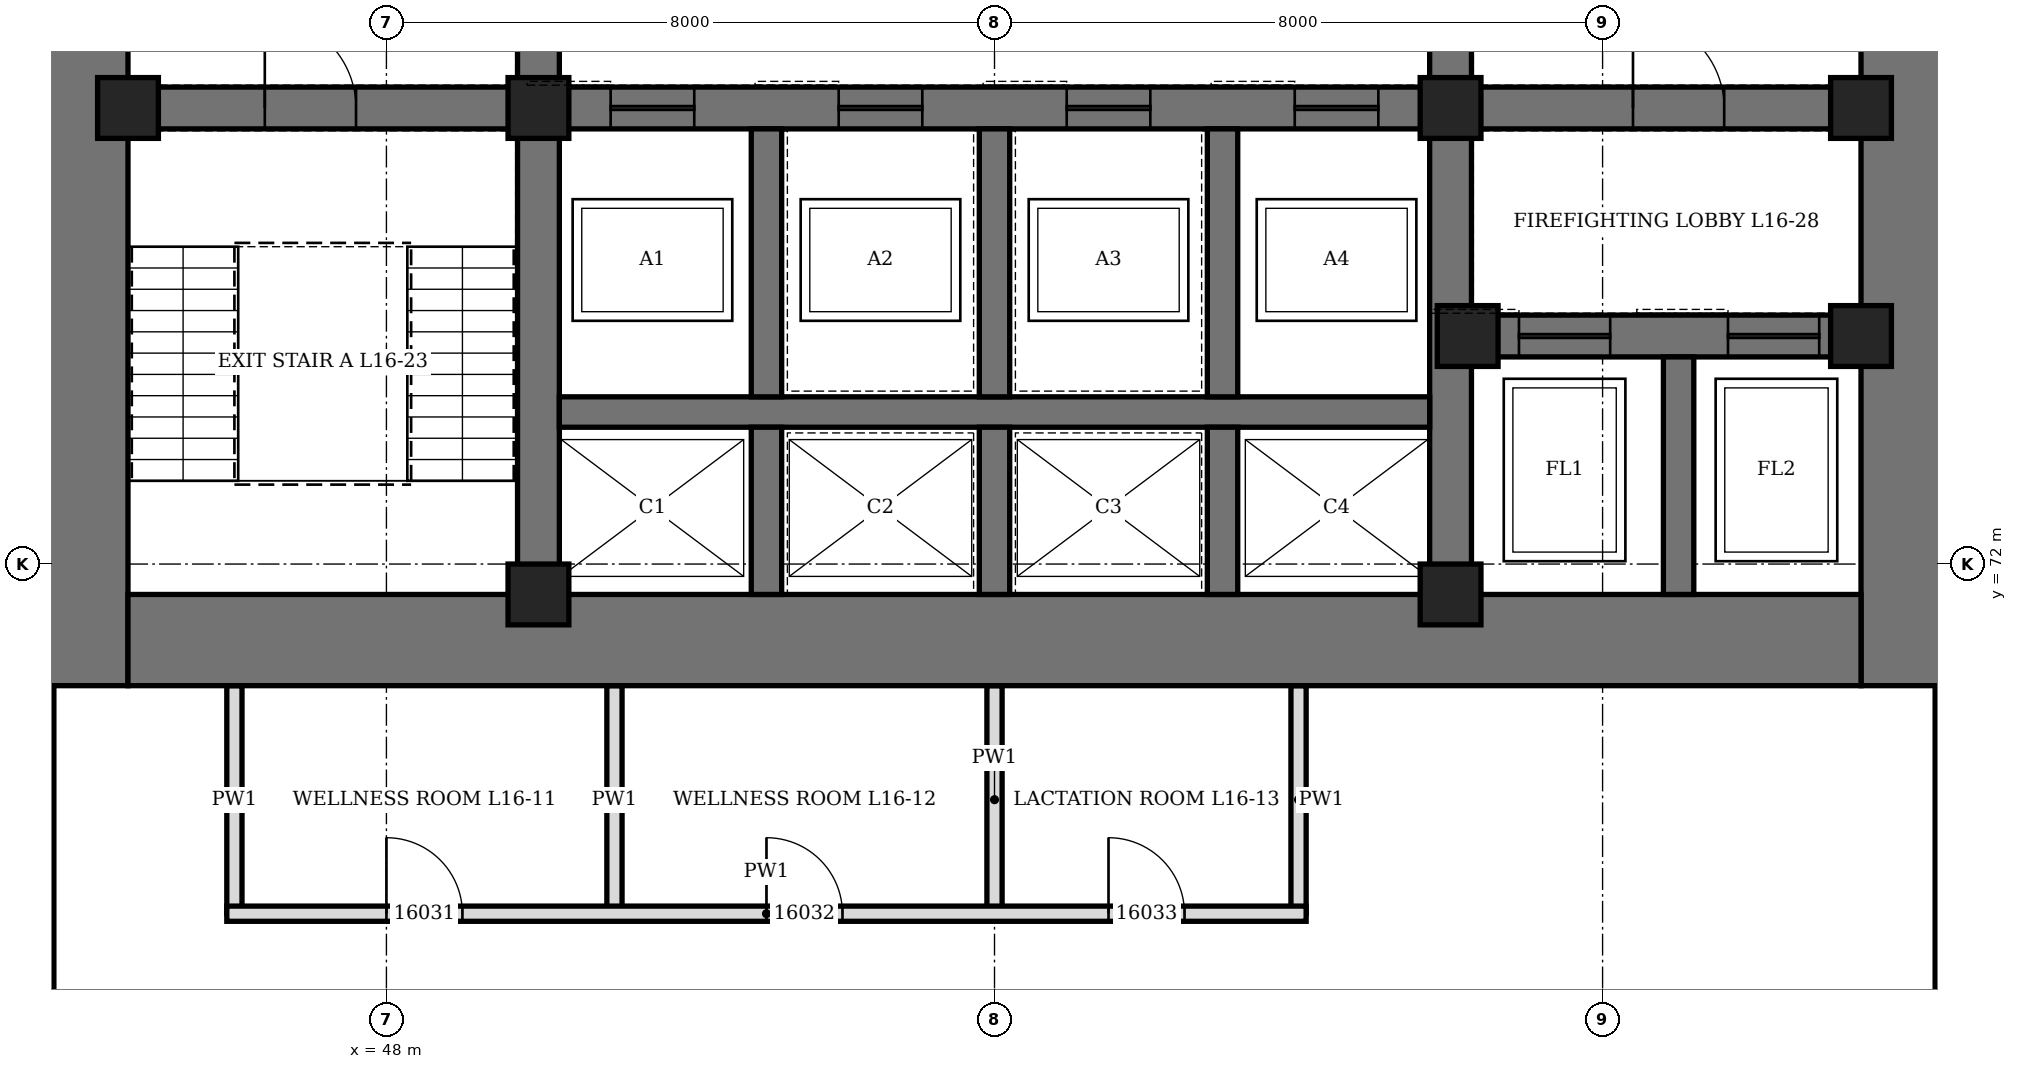
"""IFC4 building model, lengths in metres.
Left out: names, types, materials, properties, quantities, classifications, styles, units other than length and angle.
Written with IfcOpenShell. Run it as: python <this file> out.ifc"""

import sys

from ifc_helpers import new_model, si_unit, direction, frame, frame_2d, origin, origin_2d, place, context, subcontext, project, spatial, rectangle, hollow_rectangle, extrude, element, fill, save


model = new_model("IFC4")
c1 = context("Model", 3, precision=1e-05, world=origin(), true_north=direction((0.0, 1.0)))
c2 = subcontext(c1, "Body", "Model", "MODEL_VIEW")
j1 = project(units=[si_unit("LENGTHUNIT", "METRE"), si_unit("PLANEANGLEUNIT", "RADIAN")], contexts=[c1])
p1 = place(None, origin())
s1 = spatial("IfcSite", under=j1, at=p1, CompositionType="ELEMENT")
p2 = place(p1, origin())
s2 = spatial("IfcBuilding", under=s1, at=p2, CompositionType="ELEMENT")
p3 = place(p2, frame((0.0, 0.0, 76.9)))
s3 = spatial("IfcBuildingStorey", under=s2, at=p3, CompositionType="ELEMENT", Elevation=76.9)
p4 = place(p3, frame((44.0, 70.4, 0.0), z_axis=(0.0, 0.0, 1.0), x_axis=(0.0, 1.0, 0.0)))
e1 = element("IfcWall", 1, at=p4, inside=s3, PredefinedType="SHEAR", context=c2, shape_type="SweptSolid", body=[
    extrude(rectangle(XDim=19.2, YDim=1.2, at=frame_2d((9.6, 0.0))), origin(), (0.0, 0.0, 1.0), 4.2),
])
p5 = place(p4, frame((8.6, 0.0, 0.0)))
e2 = element("IfcOpeningElement", 2, at=p5, cuts=e1, PredefinedType="OPENING", context=c2, shape_type="SweptSolid", body=[
    extrude(rectangle(XDim=2.0, YDim=2.4, at=frame_2d((1.0, 1.2))), frame((0.0, 0.61, 0.0), z_axis=(0.0, -1.0, 0.0), x_axis=(1.0, 0.0, 0.0)), (0.0, 0.0, 1.0), 1.22),
])
p6 = place(p3, frame((68.0, 70.4, 0.0), z_axis=(0.0, 0.0, 1.0), x_axis=(0.0, 1.0, 0.0)))
e3 = element("IfcWall", 3, at=p6, inside=s3, PredefinedType="SHEAR", context=c2, shape_type="SweptSolid", body=[
    extrude(rectangle(XDim=19.2, YDim=1.2, at=frame_2d((9.6, 0.0))), origin(), (0.0, 0.0, 1.0), 4.2),
])
p7 = place(p6, frame((8.6, 0.0, 0.0)))
e4 = element("IfcOpeningElement", 4, at=p7, cuts=e3, PredefinedType="OPENING", context=c2, shape_type="SweptSolid", body=[
    extrude(rectangle(XDim=2.0, YDim=2.4, at=frame_2d((1.0, 1.2))), frame((0.0, 0.61, 0.0), z_axis=(0.0, -1.0, 0.0), x_axis=(1.0, 0.0, 0.0)), (0.0, 0.0, 1.0), 1.22),
])
p8 = place(p3, frame((44.6, 71.0, 0.0), z_axis=(0.0, 0.0, 1.0), x_axis=(1.0, 0.0, 0.0)))
e5 = element("IfcWall", 5, at=p8, inside=s3, PredefinedType="SHEAR", context=c2, shape_type="SweptSolid", body=[
    extrude(rectangle(XDim=22.8, YDim=1.2, at=frame_2d((11.4, 0.0))), origin(), (0.0, 0.0, 1.0), 4.2),
])
p9 = place(p3, frame((50.0, 71.6, 0.0), z_axis=(0.0, 0.0, 1.0), x_axis=(0.0, 1.0, 0.0)))
e6 = element("IfcWall", 6, at=p9, inside=s3, PredefinedType="SHEAR", context=c2, shape_type="SweptSolid", body=[
    extrude(rectangle(XDim=16.8, YDim=0.55, at=frame_2d((8.4, 0.0))), origin(), (0.0, 0.0, 1.0), 4.2),
])
p10 = place(p9, frame((7.5, 0.0, 0.0)))
e7 = element("IfcOpeningElement", 7, at=p10, cuts=e6, PredefinedType="OPENING", context=c2, shape_type="SweptSolid", body=[
    extrude(rectangle(XDim=1.8, YDim=2.4, at=frame_2d((0.9, 1.2))), frame((0.0, 0.285, 0.0), z_axis=(0.0, -1.0, 0.0), x_axis=(1.0, 0.0, 0.0)), (0.0, 0.0, 1.0), 0.57),
])
p11 = place(p3, frame((62.0, 71.6, 0.0), z_axis=(0.0, 0.0, 1.0), x_axis=(0.0, 1.0, 0.0)))
e8 = element("IfcWall", 8, at=p11, inside=s3, PredefinedType="SHEAR", context=c2, shape_type="SweptSolid", body=[
    extrude(rectangle(XDim=16.8, YDim=0.55, at=frame_2d((8.4, 0.0))), origin(), (0.0, 0.0, 1.0), 4.2),
])
p12 = place(p11, frame((7.5, 0.0, 0.0)))
e9 = element("IfcOpeningElement", 9, at=p12, cuts=e8, PredefinedType="OPENING", context=c2, shape_type="SweptSolid", body=[
    extrude(rectangle(XDim=1.8, YDim=2.4, at=frame_2d((0.9, 1.2))), frame((0.0, 0.285, 0.0), z_axis=(0.0, -1.0, 0.0), x_axis=(1.0, 0.0, 0.0)), (0.0, 0.0, 1.0), 0.57),
])
p13 = place(p3, frame((44.6, 78.0, 0.0), z_axis=(0.0, 0.0, 1.0), x_axis=(1.0, 0.0, 0.0)))
e10 = element("IfcWall", 10, at=p13, inside=s3, PredefinedType="SHEAR", context=c2, shape_type="SweptSolid", body=[
    extrude(rectangle(XDim=5.125, YDim=0.55, at=frame_2d((2.562, 0.0))), origin(), (0.0, 0.0, 1.0), 4.2),
])
p14 = place(p13, frame((1.8, 0.0, 0.0)))
e11 = element("IfcOpeningElement", 11, at=p14, cuts=e10, PredefinedType="OPENING", context=c2, shape_type="SweptSolid", body=[
    extrude(rectangle(XDim=1.2, YDim=2.1, at=frame_2d((0.6, 1.05))), frame((0.0, 0.285, 0.0), z_axis=(0.0, -1.0, 0.0), x_axis=(1.0, 0.0, 0.0)), (0.0, 0.0, 1.0), 0.57),
])
p15 = place(p3, frame((62.275, 75.0, 0.0), z_axis=(0.0, 0.0, 1.0), x_axis=(1.0, 0.0, 0.0)))
e12 = element("IfcWall", 12, at=p15, inside=s3, PredefinedType="SHEAR", context=c2, shape_type="SweptSolid", body=[
    extrude(rectangle(XDim=5.125, YDim=0.55, at=frame_2d((2.562, 0.0))), origin(), (0.0, 0.0, 1.0), 4.2),
])
p16 = place(p15, frame((0.625, 0.0, 0.0)))
e13 = element("IfcOpeningElement", 13, at=p16, cuts=e12, PredefinedType="OPENING", context=c2, shape_type="SweptSolid", body=[
    extrude(rectangle(XDim=1.2, YDim=2.2, at=frame_2d((0.6, 1.1))), frame((0.0, 0.285, 0.0), z_axis=(0.0, -1.0, 0.0), x_axis=(1.0, 0.0, 0.0)), (0.0, 0.0, 1.0), 0.57),
])
p17 = place(p15, frame((3.375, 0.0, 0.0)))
e14 = element("IfcOpeningElement", 14, at=p17, cuts=e12, PredefinedType="OPENING", context=c2, shape_type="SweptSolid", body=[
    extrude(rectangle(XDim=1.2, YDim=2.2, at=frame_2d((0.6, 1.1))), frame((0.0, 0.285, 0.0), z_axis=(0.0, -1.0, 0.0), x_axis=(1.0, 0.0, 0.0)), (0.0, 0.0, 1.0), 0.57),
])
p18 = place(p3, frame((62.275, 78.0, 0.0), z_axis=(0.0, 0.0, 1.0), x_axis=(1.0, 0.0, 0.0)))
e15 = element("IfcWall", 15, at=p18, inside=s3, PredefinedType="SHEAR", context=c2, shape_type="SweptSolid", body=[
    extrude(rectangle(XDim=5.125, YDim=0.55, at=frame_2d((2.562, 0.0))), origin(), (0.0, 0.0, 1.0), 4.2),
])
p19 = place(p18, frame((2.125, 0.0, 0.0)))
e16 = element("IfcOpeningElement", 16, at=p19, cuts=e15, PredefinedType="OPENING", context=c2, shape_type="SweptSolid", body=[
    extrude(rectangle(XDim=1.2, YDim=2.1, at=frame_2d((0.6, 1.05))), frame((0.0, 0.285, 0.0), z_axis=(0.0, -1.0, 0.0), x_axis=(1.0, 0.0, 0.0)), (0.0, 0.0, 1.0), 0.57),
])
p20 = place(p3, frame((50.275, 78.0, 0.0), z_axis=(0.0, 0.0, 1.0), x_axis=(1.0, 0.0, 0.0)))
e17 = element("IfcWall", 17, at=p20, inside=s3, PredefinedType="SHEAR", context=c2, shape_type="SweptSolid", body=[
    extrude(rectangle(XDim=11.45, YDim=0.55, at=frame_2d((5.725, 0.0))), origin(), (0.0, 0.0, 1.0), 4.2),
])
p21 = place(p20, frame((0.675, 0.0, 0.0)))
e18 = element("IfcOpeningElement", 18, at=p21, cuts=e17, PredefinedType="OPENING", context=c2, shape_type="SweptSolid", body=[
    extrude(rectangle(XDim=1.1, YDim=2.2, at=frame_2d((0.55, 1.1))), frame((0.0, 0.285, 0.0), z_axis=(0.0, -1.0, 0.0), x_axis=(1.0, 0.0, 0.0)), (0.0, 0.0, 1.0), 0.57),
])
p22 = place(p20, frame((3.675, 0.0, 0.0)))
e19 = element("IfcOpeningElement", 19, at=p22, cuts=e17, PredefinedType="OPENING", context=c2, shape_type="SweptSolid", body=[
    extrude(rectangle(XDim=1.1, YDim=2.2, at=frame_2d((0.55, 1.1))), frame((0.0, 0.285, 0.0), z_axis=(0.0, -1.0, 0.0), x_axis=(1.0, 0.0, 0.0)), (0.0, 0.0, 1.0), 0.57),
])
p23 = place(p20, frame((6.675, 0.0, 0.0)))
e20 = element("IfcOpeningElement", 20, at=p23, cuts=e17, PredefinedType="OPENING", context=c2, shape_type="SweptSolid", body=[
    extrude(rectangle(XDim=1.1, YDim=2.2, at=frame_2d((0.55, 1.1))), frame((0.0, 0.285, 0.0), z_axis=(0.0, -1.0, 0.0), x_axis=(1.0, 0.0, 0.0)), (0.0, 0.0, 1.0), 0.57),
])
p24 = place(p20, frame((9.675, 0.0, 0.0)))
e21 = element("IfcOpeningElement", 21, at=p24, cuts=e17, PredefinedType="OPENING", context=c2, shape_type="SweptSolid", body=[
    extrude(rectangle(XDim=1.1, YDim=2.2, at=frame_2d((0.55, 1.1))), frame((0.0, 0.285, 0.0), z_axis=(0.0, -1.0, 0.0), x_axis=(1.0, 0.0, 0.0)), (0.0, 0.0, 1.0), 0.57),
])
p25 = place(p3, frame((50.275, 74.0, 0.0), z_axis=(0.0, 0.0, 1.0), x_axis=(1.0, 0.0, 0.0)))
e22 = element("IfcWall", 22, at=p25, inside=s3, PredefinedType="SHEAR", context=c2, shape_type="SweptSolid", body=[
    extrude(rectangle(XDim=11.45, YDim=0.4, at=frame_2d((5.725, 0.0))), origin(), (0.0, 0.0, 1.0), 4.2),
])
p26 = place(p3, frame((53.0, 71.6, 0.0), z_axis=(0.0, 0.0, 1.0), x_axis=(0.0, 1.0, 0.0)))
e23 = element("IfcWall", 23, at=p26, inside=s3, PredefinedType="SHEAR", context=c2, shape_type="SweptSolid", body=[
    extrude(rectangle(XDim=2.2, YDim=0.4, at=frame_2d((1.1, 0.0))), origin(), (0.0, 0.0, 1.0), 4.2),
])
p27 = place(p3, frame((53.0, 74.2, 0.0), z_axis=(0.0, 0.0, 1.0), x_axis=(0.0, 1.0, 0.0)))
e24 = element("IfcWall", 24, at=p27, inside=s3, PredefinedType="SHEAR", context=c2, shape_type="SweptSolid", body=[
    extrude(rectangle(XDim=3.525, YDim=0.4, at=frame_2d((1.763, 0.0))), origin(), (0.0, 0.0, 1.0), 4.2),
])
p28 = place(p3, frame((56.0, 71.6, 0.0), z_axis=(0.0, 0.0, 1.0), x_axis=(0.0, 1.0, 0.0)))
e25 = element("IfcWall", 25, at=p28, inside=s3, PredefinedType="SHEAR", context=c2, shape_type="SweptSolid", body=[
    extrude(rectangle(XDim=2.2, YDim=0.4, at=frame_2d((1.1, 0.0))), origin(), (0.0, 0.0, 1.0), 4.2),
])
p29 = place(p3, frame((56.0, 74.2, 0.0), z_axis=(0.0, 0.0, 1.0), x_axis=(0.0, 1.0, 0.0)))
e26 = element("IfcWall", 26, at=p29, inside=s3, PredefinedType="SHEAR", context=c2, shape_type="SweptSolid", body=[
    extrude(rectangle(XDim=3.525, YDim=0.4, at=frame_2d((1.763, 0.0))), origin(), (0.0, 0.0, 1.0), 4.2),
])
p30 = place(p3, frame((59.0, 71.6, 0.0), z_axis=(0.0, 0.0, 1.0), x_axis=(0.0, 1.0, 0.0)))
e27 = element("IfcWall", 27, at=p30, inside=s3, PredefinedType="SHEAR", context=c2, shape_type="SweptSolid", body=[
    extrude(rectangle(XDim=2.2, YDim=0.4, at=frame_2d((1.1, 0.0))), origin(), (0.0, 0.0, 1.0), 4.2),
])
p31 = place(p3, frame((59.0, 74.2, 0.0), z_axis=(0.0, 0.0, 1.0), x_axis=(0.0, 1.0, 0.0)))
e28 = element("IfcWall", 28, at=p31, inside=s3, PredefinedType="SHEAR", context=c2, shape_type="SweptSolid", body=[
    extrude(rectangle(XDim=3.525, YDim=0.4, at=frame_2d((1.763, 0.0))), origin(), (0.0, 0.0, 1.0), 4.2),
])
p32 = place(p3, frame((65.0, 71.6, 0.0), z_axis=(0.0, 0.0, 1.0), x_axis=(0.0, 1.0, 0.0)))
e29 = element("IfcWall", 29, at=p32, inside=s3, PredefinedType="SHEAR", context=c2, shape_type="SweptSolid", body=[
    extrude(rectangle(XDim=3.125, YDim=0.4, at=frame_2d((1.562, 0.0))), origin(), (0.0, 0.0, 1.0), 4.2),
])
for number, where, z_axis, x_axis in (
    (30, (44.6, 78.0, 0.0), (0.0, 0.0, 1.0), (1.0, 0.0, 0.0)),
    (31, (50.0, 71.6, 0.0), (0.0, 0.0, 1.0), (1.0, 0.0, 0.0)),
    (32, (50.0, 78.0, 0.0), (0.0, 0.0, 1.0), (1.0, 0.0, 0.0)),
    (33, (62.0, 71.6, 0.0), (0.0, 0.0, 1.0), (1.0, 0.0, 0.0)),
    (34, (62.0, 78.0, 0.0), (0.0, 0.0, 1.0), (1.0, 0.0, 0.0)),
    (35, (62.225, 75.0, 0.0), (0.0, 0.0, 1.0), (1.0, 0.0, 0.0)),
    (36, (67.4, 75.0, 0.0), (0.0, 0.0, 1.0), (1.0, 0.0, 0.0)),
    (37, (67.4, 78.0, 0.0), (0.0, 0.0, 1.0), (1.0, 0.0, 0.0)),
):
    element("IfcColumn", number, at=place(p3, frame(where, z_axis=z_axis, x_axis=x_axis)), inside=s3, PredefinedType="COLUMN", context=c2, shape_type="SweptSolid", body=[
        extrude(hollow_rectangle(XDim=0.8, YDim=0.8, WallThickness=0.1, at=origin_2d()), origin(), (0.0, 0.0, 1.0), 4.2),
    ])
for number, where, z_axis, x_axis in (
    (38, (46.0, 67.4, 0.0), (0.0, 0.0, 1.0), (0.0, 1.0, 0.0)),
    (39, (51.0, 67.4, 0.0), (0.0, 0.0, 1.0), (0.0, 1.0, 0.0)),
    (40, (56.0, 67.4, 0.0), (0.0, 0.0, 1.0), (0.0, 1.0, 0.0)),
    (41, (60.0, 67.4, 0.0), (0.0, 0.0, 1.0), (0.0, 1.0, 0.0)),
):
    element("IfcWall", number, at=place(p3, frame(where, z_axis=z_axis, x_axis=x_axis)), inside=s3, PredefinedType="PARTITIONING", context=c2, shape_type="SweptSolid", body=[
        extrude(rectangle(XDim=3.0, YDim=0.2, at=frame_2d((1.5, 0.0))), origin(), (0.0, 0.0, 1.0), 4.04),
    ])
p33 = place(p3, frame((45.9, 67.4, 0.0), z_axis=(0.0, 0.0, 1.0), x_axis=(1.0, 0.0, 0.0)))
e42 = element("IfcWall", 42, at=p33, inside=s3, PredefinedType="PARTITIONING", context=c2, shape_type="SweptSolid", body=[
    extrude(rectangle(XDim=14.2, YDim=0.2, at=frame_2d((7.1, 0.0))), origin(), (0.0, 0.0, 1.0), 4.04),
])
p34 = place(p33, frame((2.1, 0.0, 0.0)))
e43 = element("IfcOpeningElement", 43, at=p34, cuts=e42, PredefinedType="OPENING", context=c2, shape_type="SweptSolid", body=[
    extrude(rectangle(XDim=1.0, YDim=2.1, at=frame_2d((0.5, 1.05))), frame((0.0, 0.11, 0.0), z_axis=(0.0, -1.0, 0.0), x_axis=(1.0, 0.0, 0.0)), (0.0, 0.0, 1.0), 0.22),
])
p35 = place(p33, frame((7.1, 0.0, 0.0)))
e44 = element("IfcOpeningElement", 44, at=p35, cuts=e42, PredefinedType="OPENING", context=c2, shape_type="SweptSolid", body=[
    extrude(rectangle(XDim=1.0, YDim=2.1, at=frame_2d((0.5, 1.05))), frame((0.0, 0.11, 0.0), z_axis=(0.0, -1.0, 0.0), x_axis=(1.0, 0.0, 0.0)), (0.0, 0.0, 1.0), 0.22),
])
p36 = place(p33, frame((11.6, 0.0, 0.0)))
e45 = element("IfcOpeningElement", 45, at=p36, cuts=e42, PredefinedType="OPENING", context=c2, shape_type="SweptSolid", body=[
    extrude(rectangle(XDim=1.0, YDim=2.1, at=frame_2d((0.5, 1.05))), frame((0.0, 0.11, 0.0), z_axis=(0.0, -1.0, 0.0), x_axis=(1.0, 0.0, 0.0)), (0.0, 0.0, 1.0), 0.22),
])
p37 = place(p3, frame((43.55, 55.31, 0.0), z_axis=(0.0, 0.0, 1.0), x_axis=(0.0, 1.0, 0.0)))
e46 = element("IfcWall", 46, at=p37, inside=s3, PredefinedType="PARTITIONING", context=c2, shape_type="SweptSolid", body=[
    extrude(rectangle(XDim=15.09, YDim=0.15, at=frame_2d((7.545, 0.0))), origin(), (0.0, 0.0, 1.0), 4.04),
])
p38 = place(p37, frame((7.045, 0.0, 0.0)))
e47 = element("IfcOpeningElement", 47, at=p38, cuts=e46, PredefinedType="OPENING", context=c2, shape_type="SweptSolid", body=[
    extrude(rectangle(XDim=1.0, YDim=2.4, at=frame_2d((0.5, 1.2))), frame((0.0, 0.085, 0.0), z_axis=(0.0, -1.0, 0.0), x_axis=(1.0, 0.0, 0.0)), (0.0, 0.0, 1.0), 0.17),
])
p39 = place(p3, frame((68.45, 55.31, 0.0), z_axis=(0.0, 0.0, 1.0), x_axis=(0.0, 1.0, 0.0)))
e48 = element("IfcWall", 48, at=p39, inside=s3, PredefinedType="PARTITIONING", context=c2, shape_type="SweptSolid", body=[
    extrude(rectangle(XDim=15.09, YDim=0.15, at=frame_2d((7.545, 0.0))), origin(), (0.0, 0.0, 1.0), 4.04),
])
p40 = place(p39, frame((7.045, 0.0, 0.0)))
e49 = element("IfcOpeningElement", 49, at=p40, cuts=e48, PredefinedType="OPENING", context=c2, shape_type="SweptSolid", body=[
    extrude(rectangle(XDim=1.0, YDim=2.4, at=frame_2d((0.5, 1.2))), frame((0.0, 0.085, 0.0), z_axis=(0.0, -1.0, 0.0), x_axis=(1.0, 0.0, 0.0)), (0.0, 0.0, 1.0), 0.17),
])
p41 = place(p14, origin())
e50 = element("IfcDoor", 50, at=p41, inside=s3, OperationType="SINGLE_SWING_LEFT", PredefinedType="DOOR", context=c2, shape_type="SweptSolid", body=[
    extrude(rectangle(XDim=1.2, YDim=2.1, at=frame_2d((0.6, 1.05))), frame((0.0, 0.275, 0.0), z_axis=(0.0, -1.0, 0.0), x_axis=(1.0, 0.0, 0.0)), (0.0, 0.0, 1.0), 0.55),
])
fill(e11, e50)
p42 = place(p19, origin())
e51 = element("IfcDoor", 51, at=p42, inside=s3, OperationType="SINGLE_SWING_RIGHT", PredefinedType="DOOR", context=c2, shape_type="SweptSolid", body=[
    extrude(rectangle(XDim=1.2, YDim=2.1, at=frame_2d((0.6, 1.05))), frame((0.0, 0.275, 0.0), z_axis=(0.0, -1.0, 0.0), x_axis=(1.0, 0.0, 0.0)), (0.0, 0.0, 1.0), 0.55),
])
fill(e16, e51)
p43 = place(p21, origin())
e52 = element("IfcDoor", 52, at=p43, inside=s3, OperationType="SLIDING_TO_LEFT", PredefinedType="DOOR", context=c2, shape_type="SweptSolid", body=[
    extrude(rectangle(XDim=1.1, YDim=2.2, at=frame_2d((0.55, 1.1))), frame((0.0, 0.275, 0.0), z_axis=(0.0, -1.0, 0.0), x_axis=(1.0, 0.0, 0.0)), (0.0, 0.0, 1.0), 0.55),
])
fill(e18, e52)
p44 = place(p22, origin())
e53 = element("IfcDoor", 53, at=p44, inside=s3, OperationType="SLIDING_TO_LEFT", PredefinedType="DOOR", context=c2, shape_type="SweptSolid", body=[
    extrude(rectangle(XDim=1.1, YDim=2.2, at=frame_2d((0.55, 1.1))), frame((0.0, 0.275, 0.0), z_axis=(0.0, -1.0, 0.0), x_axis=(1.0, 0.0, 0.0)), (0.0, 0.0, 1.0), 0.55),
])
fill(e19, e53)
p45 = place(p23, origin())
e54 = element("IfcDoor", 54, at=p45, inside=s3, OperationType="SLIDING_TO_LEFT", PredefinedType="DOOR", context=c2, shape_type="SweptSolid", body=[
    extrude(rectangle(XDim=1.1, YDim=2.2, at=frame_2d((0.55, 1.1))), frame((0.0, 0.275, 0.0), z_axis=(0.0, -1.0, 0.0), x_axis=(1.0, 0.0, 0.0)), (0.0, 0.0, 1.0), 0.55),
])
fill(e20, e54)
p46 = place(p24, origin())
e55 = element("IfcDoor", 55, at=p46, inside=s3, OperationType="SLIDING_TO_LEFT", PredefinedType="DOOR", context=c2, shape_type="SweptSolid", body=[
    extrude(rectangle(XDim=1.1, YDim=2.2, at=frame_2d((0.55, 1.1))), frame((0.0, 0.275, 0.0), z_axis=(0.0, -1.0, 0.0), x_axis=(1.0, 0.0, 0.0)), (0.0, 0.0, 1.0), 0.55),
])
fill(e21, e55)
p47 = place(p16, origin())
e56 = element("IfcDoor", 56, at=p47, inside=s3, OperationType="SLIDING_TO_LEFT", PredefinedType="DOOR", context=c2, shape_type="SweptSolid", body=[
    extrude(rectangle(XDim=1.2, YDim=2.2, at=frame_2d((0.6, 1.1))), frame((0.0, 0.275, 0.0), z_axis=(0.0, -1.0, 0.0), x_axis=(1.0, 0.0, 0.0)), (0.0, 0.0, 1.0), 0.55),
])
fill(e13, e56)
p48 = place(p17, origin())
e57 = element("IfcDoor", 57, at=p48, inside=s3, OperationType="SLIDING_TO_LEFT", PredefinedType="DOOR", context=c2, shape_type="SweptSolid", body=[
    extrude(rectangle(XDim=1.2, YDim=2.2, at=frame_2d((0.6, 1.1))), frame((0.0, 0.275, 0.0), z_axis=(0.0, -1.0, 0.0), x_axis=(1.0, 0.0, 0.0)), (0.0, 0.0, 1.0), 0.55),
])
fill(e14, e57)
p49 = place(p34, origin())
e58 = element("IfcDoor", 58, at=p49, inside=s3, OperationType="SINGLE_SWING_LEFT", PredefinedType="DOOR", context=c2, shape_type="SweptSolid", body=[
    extrude(rectangle(XDim=1.0, YDim=2.1, at=frame_2d((0.5, 1.05))), frame((0.0, 0.1, 0.0), z_axis=(0.0, -1.0, 0.0), x_axis=(1.0, 0.0, 0.0)), (0.0, 0.0, 1.0), 0.199),
])
fill(e43, e58)
p50 = place(p35, origin())
e59 = element("IfcDoor", 59, at=p50, inside=s3, OperationType="SINGLE_SWING_LEFT", PredefinedType="DOOR", context=c2, shape_type="SweptSolid", body=[
    extrude(rectangle(XDim=1.0, YDim=2.1, at=frame_2d((0.5, 1.05))), frame((0.0, 0.1, 0.0), z_axis=(0.0, -1.0, 0.0), x_axis=(1.0, 0.0, 0.0)), (0.0, 0.0, 1.0), 0.199),
])
fill(e44, e59)
p51 = place(p36, origin())
e60 = element("IfcDoor", 60, at=p51, inside=s3, OperationType="SINGLE_SWING_LEFT", PredefinedType="DOOR", context=c2, shape_type="SweptSolid", body=[
    extrude(rectangle(XDim=1.0, YDim=2.1, at=frame_2d((0.5, 1.05))), frame((0.0, 0.1, 0.0), z_axis=(0.0, -1.0, 0.0), x_axis=(1.0, 0.0, 0.0)), (0.0, 0.0, 1.0), 0.199),
])
fill(e45, e60)
save(model, sys.argv[1])
